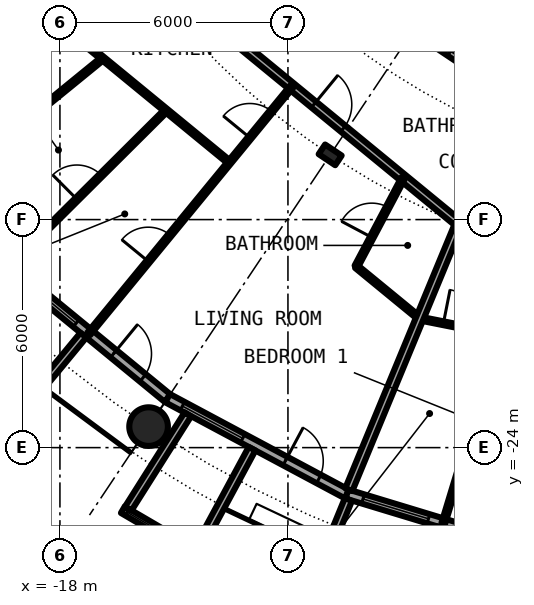
"""IFC4 building model, lengths in metres.
Left out: names, types, materials, properties, quantities, classifications, styles, units other than length and angle.
Written with IfcOpenShell. Run it as: python <this file> out.ifc"""

import sys

from ifc_helpers import new_model, si_unit, direction, frame, frame_2d, origin, origin_2d, place, context, subcontext, project, spatial, rectangle, circle, hollow_circle, i_section, extrude, element, fill, save


model = new_model("IFC4")
c1 = context("Model", 3, precision=1e-05, world=origin(), true_north=direction((0.0, 1.0)))
c2 = subcontext(c1, "Body", "Model", "MODEL_VIEW")
j1 = project(units=[si_unit("LENGTHUNIT", "METRE"), si_unit("PLANEANGLEUNIT", "RADIAN")], contexts=[c1])
p1 = place(None, origin())
s1 = spatial("IfcSite", under=j1, at=p1, CompositionType="ELEMENT")
p2 = place(p1, origin())
s2 = spatial("IfcBuilding", under=s1, at=p2, CompositionType="ELEMENT")
p3 = place(p2, frame((0.0, 0.0, 91.05)))
s3 = spatial("IfcBuildingStorey", under=s2, at=p3, CompositionType="ELEMENT", Elevation=91.05)
p4 = place(p3, frame((-15.667, -23.448, 0.0), z_axis=(0.0, 0.0, 1.0), x_axis=(1.0, 0.0, 0.0)))
e1 = element("IfcColumn", 1, at=p4, inside=s3, PredefinedType="COLUMN", context=c2, shape_type="SweptSolid", body=[
    extrude(hollow_circle(Radius=0.508, WallThickness=0.04, at=origin_2d()), origin(), (0.0, 0.0, 1.0), 3.05),
])
p5 = place(p3, frame((-10.889, -16.297, 0.0), z_axis=(0.0, 0.0, 1.0), x_axis=(-0.55557023302, -0.831469612303, 0.0)))
e2 = element("IfcColumn", 2, at=p5, inside=s3, PredefinedType="COLUMN", context=c2, shape_type="SweptSolid", body=[
    extrude(i_section(OverallWidth=0.306, OverallDepth=0.524, WebThickness=0.021, FlangeThickness=0.04, FilletRadius=0.027, at=origin_2d()), origin(), (0.0, 0.0, 1.0), 3.05),
])
p6 = place(p3, frame((-19.304, -19.304, 0.0), z_axis=(0.0, 0.0, 1.0), x_axis=(0.773019449054, -0.634382322723, 0.0)))
e3 = element("IfcWall", 3, at=p6, inside=s3, PredefinedType="SOLIDWALL", context=c2, shape_type="SweptSolid", body=[
    extrude(rectangle(XDim=5.352, YDim=0.25, at=frame_2d((2.676, 0.0))), origin(), (0.0, 0.0, 1.0), 2.7),
])
p7 = place(p6, frame((0.441, 0.0, 0.3)))
e4 = element("IfcOpeningElement", 4, at=p7, cuts=e3, PredefinedType="OPENING", context=c2, shape_type="SweptSolid", body=[
    extrude(rectangle(XDim=1.8, YDim=2.1, at=frame_2d((0.9, 1.05))), frame((0.0, 0.135, 0.0), z_axis=(0.0, -1.0, 0.0), x_axis=(1.0, 0.0, 0.0)), (0.0, 0.0, 1.0), 0.27),
])
p8 = place(p6, frame((3.51, 0.0, 0.0)))
e5 = element("IfcOpeningElement", 5, at=p8, cuts=e3, PredefinedType="OPENING", context=c2, shape_type="SweptSolid", body=[
    extrude(rectangle(XDim=1.0, YDim=2.2, at=frame_2d((0.5, 1.1))), frame((0.0, 0.135, 0.0), z_axis=(0.0, -1.0, 0.0), x_axis=(1.0, 0.0, 0.0)), (0.0, 0.0, 1.0), 0.27),
])
p9 = place(p3, frame((-17.384, -21.041, -0.03), z_axis=(0.0, 0.0, 1.0), x_axis=(-0.63709551667, -0.770784861449, 0.0)))
e6 = element("IfcWall", 6, at=p9, inside=s3, PredefinedType="SOLIDWALL", context=c2, shape_type="SweptSolid", body=[
    extrude(rectangle(XDim=3.006, YDim=0.2, at=frame_2d((1.503, 0.0))), origin(), (0.0, 0.0, 1.0), 2.73),
])
p10 = place(p3, frame((-15.167, -22.699, 0.0), z_axis=(0.0, 0.0, 1.0), x_axis=(0.881915646801, -0.471407246368, 0.0)))
e7 = element("IfcWall", 7, at=p10, inside=s3, PredefinedType="SOLIDWALL", context=c2, shape_type="SweptSolid", body=[
    extrude(rectangle(XDim=5.352, YDim=0.25, at=frame_2d((2.676, 0.0))), origin(), (0.0, 0.0, 1.0), 2.7),
])
p11 = place(p10, frame((0.441, 0.0, 0.3)))
e8 = element("IfcOpeningElement", 8, at=p11, cuts=e7, PredefinedType="OPENING", context=c2, shape_type="SweptSolid", body=[
    extrude(rectangle(XDim=1.8, YDim=2.1, at=frame_2d((0.9, 1.05))), frame((0.0, 0.135, 0.0), z_axis=(0.0, -1.0, 0.0), x_axis=(1.0, 0.0, 0.0)), (0.0, 0.0, 1.0), 0.27),
])
p12 = place(p10, frame((3.51, 0.0, 0.0)))
e9 = element("IfcOpeningElement", 9, at=p12, cuts=e7, PredefinedType="OPENING", context=c2, shape_type="SweptSolid", body=[
    extrude(rectangle(XDim=1.0, YDim=2.2, at=frame_2d((0.5, 1.1))), frame((0.0, 0.135, 0.0), z_axis=(0.0, -1.0, 0.0), x_axis=(1.0, 0.0, 0.0)), (0.0, 0.0, 1.0), 0.27),
])
p13 = place(p3, frame((-16.344, -25.633, -0.03), z_axis=(0.0, 0.0, 1.0), x_axis=(0.863346521872, -0.504611517081, 0.0)))
e10 = element("IfcWall", 10, at=p13, inside=s3, PredefinedType="SOLIDWALL", context=c2, shape_type="SweptSolid", body=[
    extrude(rectangle(XDim=2.336, YDim=0.2, at=frame_2d((1.168, 0.0))), origin(), (0.0, 0.0, 1.0), 2.73),
])
p14 = place(p13, frame((0.128, 0.0, 0.33)))
e11 = element("IfcOpeningElement", 11, at=p14, cuts=e10, PredefinedType="OPENING", context=c2, shape_type="SweptSolid", body=[
    extrude(circle(Radius=1.04, at=frame_2d((1.04, 1.04))), frame((0.0, 0.11, 0.0), z_axis=(0.0, -1.0, 0.0), x_axis=(1.0, 0.0, 0.0)), (0.0, 0.0, 1.0), 0.22),
])
p15 = place(p3, frame((-14.635, -23.126, -0.03), z_axis=(0.0, 0.0, 1.0), x_axis=(-0.534437802731, -0.845207805816, 0.0)))
e12 = element("IfcWall", 12, at=p15, inside=s3, PredefinedType="SOLIDWALL", context=c2, shape_type="SweptSolid", body=[
    extrude(rectangle(XDim=2.932, YDim=0.2, at=frame_2d((1.466, 0.0))), origin(), (0.0, 0.0, 1.0), 2.73),
])
p16 = place(p3, frame((-12.945, -24.029, -0.03), z_axis=(0.0, 0.0, 1.0), x_axis=(-0.474424310775, -0.88029629861, 0.0)))
e13 = element("IfcWall", 13, at=p16, inside=s3, PredefinedType="SOLIDWALL", context=c2, shape_type="SweptSolid", body=[
    extrude(rectangle(XDim=3.006, YDim=0.2, at=frame_2d((1.503, 0.0))), origin(), (0.0, 0.0, 1.0), 2.73),
])
p17 = place(p3, frame((-10.447, -25.222, 0.0), z_axis=(0.0, 0.0, 1.0), x_axis=(0.956965678721, -0.290201119486, 0.0)))
e14 = element("IfcWall", 14, at=p17, inside=s3, PredefinedType="SOLIDWALL", context=c2, shape_type="SweptSolid", body=[
    extrude(rectangle(XDim=5.351, YDim=0.25, at=frame_2d((2.676, 0.0))), origin(), (0.0, 0.0, 1.0), 2.7),
])
p18 = place(p17, frame((0.441, 0.0, 0.3)))
e15 = element("IfcOpeningElement", 15, at=p18, cuts=e14, PredefinedType="OPENING", context=c2, shape_type="SweptSolid", body=[
    extrude(rectangle(XDim=1.8, YDim=2.1, at=frame_2d((0.9, 1.05))), frame((0.0, 0.135, 0.0), z_axis=(0.0, -1.0, 0.0), x_axis=(1.0, 0.0, 0.0)), (0.0, 0.0, 1.0), 0.27),
])
p19 = place(p17, frame((3.51, 0.0, 0.0)))
e16 = element("IfcOpeningElement", 16, at=p19, cuts=e14, PredefinedType="OPENING", context=c2, shape_type="SweptSolid", body=[
    extrude(rectangle(XDim=1.0, YDim=2.2, at=frame_2d((0.5, 1.1))), frame((0.0, 0.135, 0.0), z_axis=(0.0, -1.0, 0.0), x_axis=(1.0, 0.0, 0.0)), (0.0, 0.0, 1.0), 0.27),
])
p20 = place(p3, frame((-10.409, -25.364, -0.03), z_axis=(0.0, 0.0, 1.0), x_axis=(-0.379509886562, -0.925187681501, 0.0)))
e17 = element("IfcWall", 17, at=p20, inside=s3, PredefinedType="SOLIDWALL", context=c2, shape_type="SweptSolid", body=[
    extrude(rectangle(XDim=2.883, YDim=0.2, at=frame_2d((1.441, 0.0))), origin(), (0.0, 0.0, 1.0), 2.73),
])
p21 = place(p3, frame((-8.009, -26.092, -0.03), z_axis=(0.0, 0.0, 1.0), x_axis=(-0.293406695073, -0.955987715029, 0.0)))
e18 = element("IfcWall", 18, at=p21, inside=s3, PredefinedType="SOLIDWALL", context=c2, shape_type="SweptSolid", body=[
    extrude(rectangle(XDim=3.006, YDim=0.2, at=frame_2d((1.503, 0.0))), origin(), (0.0, 0.0, 1.0), 2.73),
])
p22 = place(p3, frame((-8.536, -20.603, 0.0), z_axis=(0.0, 0.0, 1.0), x_axis=(0.980795826794, -0.195037294239, 0.0)))
e19 = element("IfcWall", 19, at=p22, inside=s3, PredefinedType="PARTITIONING", context=c2, shape_type="SweptSolid", body=[
    extrude(rectangle(XDim=4.352, YDim=0.1, at=frame_2d((2.176, 0.0))), origin(), (0.0, 0.0, 1.0), 2.7),
])
p23 = place(p22, frame((0.639, 0.0, 0.0)))
e20 = element("IfcOpeningElement", 20, at=p23, cuts=e19, PredefinedType="OPENING", context=c2, shape_type="SweptSolid", body=[
    extrude(rectangle(XDim=0.9, YDim=2.3, at=frame_2d((0.45, 1.15))), frame((0.0, 0.06, 0.0), z_axis=(0.0, -1.0, 0.0), x_axis=(1.0, 0.0, 0.0)), (0.0, 0.0, 1.0), 0.12),
])
p24 = place(p3, frame((-18.542, -12.389, 0.0), z_axis=(0.0, 0.0, 1.0), x_axis=(0.77296666644, -0.634446634929, 0.0)))
e21 = element("IfcWall", 21, at=p24, inside=s3, PredefinedType="PARTITIONING", context=c2, shape_type="SweptSolid", body=[
    extrude(rectangle(XDim=6.474, YDim=0.1, at=frame_2d((3.237, 0.0))), origin(), (0.0, 0.0, 1.0), 2.7),
])
p25 = place(p3, frame((-10.202, -19.234, 0.0), z_axis=(0.0, 0.0, 1.0), x_axis=(0.772948171844, -0.634469166818, 0.0)))
e22 = element("IfcWall", 22, at=p25, inside=s3, PredefinedType="PARTITIONING", context=c2, shape_type="SweptSolid", body=[
    extrude(rectangle(XDim=2.158, YDim=0.1, at=frame_2d((1.079, 0.0))), origin(), (0.0, 0.0, 1.0), 2.7),
])
p26 = place(p3, frame((-16.173, -10.991, 0.0), z_axis=(0.0, 0.0, 1.0), x_axis=(0.773013989296, -0.634388975591, 0.0)))
e23 = element("IfcWall", 23, at=p26, inside=s3, PredefinedType="PARTITIONING", context=c2, shape_type="SweptSolid", body=[
    extrude(rectangle(XDim=11.219, YDim=0.2, at=frame_2d((5.609, 0.0))), origin(), (0.0, 0.0, 1.0), 2.38),
])
p27 = place(p26, frame((6.278, 0.0, 0.0)))
e24 = element("IfcOpeningElement", 24, at=p27, cuts=e23, PredefinedType="OPENING", context=c2, shape_type="SweptSolid", body=[
    extrude(rectangle(XDim=1.0, YDim=2.3, at=frame_2d((0.5, 1.15))), frame((0.0, 0.11, 0.0), z_axis=(0.0, -1.0, 0.0), x_axis=(1.0, 0.0, 0.0)), (0.0, 0.0, 1.0), 0.22),
])
p28 = place(p3, frame((-12.706, -10.291, 0.0), z_axis=(0.0, 0.0, 1.0), x_axis=(0.831588572532, -0.555392155178, 0.0)))
e25 = element("IfcWall", 25, at=p28, inside=s3, PredefinedType="PARTITIONING", context=c2, shape_type="SweptSolid", body=[
    extrude(rectangle(XDim=11.314, YDim=0.2, at=frame_2d((5.657, 0.0))), origin(), (0.0, 0.0, 1.0), 2.7),
])
p29 = place(p28, frame((5.966, 0.0, 0.0)))
e26 = element("IfcOpeningElement", 26, at=p29, cuts=e25, PredefinedType="OPENING", context=c2, shape_type="SweptSolid", body=[
    extrude(rectangle(XDim=1.0, YDim=2.3, at=frame_2d((0.5, 1.15))), frame((0.0, 0.11, 0.0), z_axis=(0.0, -1.0, 0.0), x_axis=(1.0, 0.0, 0.0)), (0.0, 0.0, 1.0), 0.22),
])
p30 = place(p3, frame((-22.595, -15.097, 0.0), z_axis=(0.0, 0.0, 1.0), x_axis=(0.831505405283, 0.555516661303, 0.0)))
e27 = element("IfcWall", 27, at=p30, inside=s3, PredefinedType="PARTITIONING", context=c2, shape_type="SweptSolid", body=[
    extrude(rectangle(XDim=7.312, YDim=0.2, at=frame_2d((3.656, 0.0))), origin(), (0.0, 0.0, 1.0), 2.7),
])
p31 = place(p3, frame((-21.061, -17.173, 0.0), z_axis=(0.0, 0.0, 1.0), x_axis=(0.774926754572, 0.632051046236, 0.0)))
e28 = element("IfcWall", 28, at=p31, inside=s3, PredefinedType="PARTITIONING", context=c2, shape_type="SweptSolid", body=[
    extrude(rectangle(XDim=5.403, YDim=0.1, at=frame_2d((2.702, 0.0))), origin(), (0.0, 0.0, 1.0), 2.7),
])
p32 = place(p31, frame((2.252, 0.0, 0.0)))
e29 = element("IfcOpeningElement", 29, at=p32, cuts=e28, PredefinedType="OPENING", context=c2, shape_type="SweptSolid", body=[
    extrude(rectangle(XDim=0.9, YDim=2.3, at=frame_2d((0.45, 1.15))), frame((0.0, 0.06, 0.0), z_axis=(0.0, -1.0, 0.0), x_axis=(1.0, 0.0, 0.0)), (0.0, 0.0, 1.0), 0.12),
])
p33 = place(p3, frame((-19.265, -19.166, 0.0), z_axis=(0.0, 0.0, 1.0), x_axis=(0.708831450128, 0.705377895393, 0.0)))
e30 = element("IfcWall", 30, at=p33, inside=s3, PredefinedType="PARTITIONING", context=c2, shape_type="SweptSolid", body=[
    extrude(rectangle(XDim=5.726, YDim=0.1, at=frame_2d((2.863, 0.0))), origin(), (0.0, 0.0, 1.0), 2.7),
])
p34 = place(p33, frame((2.413, 0.0, 0.0)))
e31 = element("IfcOpeningElement", 31, at=p34, cuts=e30, PredefinedType="OPENING", context=c2, shape_type="SweptSolid", body=[
    extrude(rectangle(XDim=0.9, YDim=2.3, at=frame_2d((0.45, 1.15))), frame((0.0, 0.06, 0.0), z_axis=(0.0, -1.0, 0.0), x_axis=(1.0, 0.0, 0.0)), (0.0, 0.0, 1.0), 0.12),
])
p35 = place(p3, frame((-17.241, -21.006, 0.0), z_axis=(0.0, 0.0, 1.0), x_axis=(0.634522338131, 0.772904523478, 0.0)))
e32 = element("IfcWall", 32, at=p35, inside=s3, PredefinedType="PARTITIONING", context=c2, shape_type="SweptSolid", body=[
    extrude(rectangle(XDim=8.419, YDim=0.1, at=frame_2d((4.209, 0.0))), origin(), (0.0, 0.0, 1.0), 2.7),
])
p36 = place(p35, frame((6.677, 0.0, 0.0)))
e33 = element("IfcOpeningElement", 33, at=p36, cuts=e32, PredefinedType="OPENING", context=c2, shape_type="SweptSolid", body=[
    extrude(rectangle(XDim=0.9, YDim=2.3, at=frame_2d((0.45, 1.15))), frame((0.0, 0.06, 0.0), z_axis=(0.0, -1.0, 0.0), x_axis=(1.0, 0.0, 0.0)), (0.0, 0.0, 1.0), 0.12),
])
p37 = place(p35, frame((2.466, 0.0, 0.0)))
e34 = element("IfcOpeningElement", 34, at=p37, cuts=e32, PredefinedType="OPENING", context=c2, shape_type="SweptSolid", body=[
    extrude(rectangle(XDim=0.9, YDim=2.3, at=frame_2d((0.45, 1.15))), frame((0.0, 0.06, 0.0), z_axis=(0.0, -1.0, 0.0), x_axis=(1.0, 0.0, 0.0)), (0.0, 0.0, 1.0), 0.12),
])
p38 = place(p3, frame((-10.399, -25.106, 0.0), z_axis=(0.0, 0.0, 1.0), x_axis=(0.382600411313, 0.923913916587, 0.0)))
e35 = element("IfcWall", 35, at=p38, inside=s3, PredefinedType="PARTITIONING", context=c2, shape_type="SweptSolid", body=[
    extrude(rectangle(XDim=7.574, YDim=0.2, at=frame_2d((3.787, 0.0))), origin(), (0.0, 0.0, 1.0), 2.7),
])
p39 = place(p3, frame((-10.202, -19.234, 0.0), z_axis=(0.0, 0.0, 1.0), x_axis=(0.468462103808, 0.883483591979, 0.0)))
e36 = element("IfcWall", 36, at=p39, inside=s3, PredefinedType="PARTITIONING", context=c2, shape_type="SweptSolid", body=[
    extrude(rectangle(XDim=2.636, YDim=0.1, at=frame_2d((1.318, 0.0))), origin(), (0.0, 0.0, 1.0), 2.7),
])
p40 = place(p39, frame((0.868, 0.0, 0.0)))
e37 = element("IfcOpeningElement", 37, at=p40, cuts=e36, PredefinedType="OPENING", context=c2, shape_type="SweptSolid", body=[
    extrude(rectangle(XDim=0.9, YDim=2.3, at=frame_2d((0.45, 1.15))), frame((0.0, 0.06, 0.0), z_axis=(0.0, -1.0, 0.0), x_axis=(1.0, 0.0, 0.0)), (0.0, 0.0, 1.0), 0.12),
])
p41 = place(p3, frame((-7.913, -25.997, 0.0), z_axis=(0.0, 0.0, 1.0), x_axis=(0.291264462755, 0.956642573136, 0.0)))
e38 = element("IfcWall", 38, at=p41, inside=s3, PredefinedType="PARTITIONING", context=c2, shape_type="SweptSolid", body=[
    extrude(rectangle(XDim=5.195, YDim=0.1, at=frame_2d((2.598, 0.0))), origin(), (0.0, 0.0, 1.0), 2.7),
])
p42 = place(p7, origin())
e39 = element("IfcWindow", 39, at=p42, inside=s3, PartitioningType="SINGLE_PANEL", PredefinedType="WINDOW", context=c2, shape_type="SweptSolid", body=[
    extrude(rectangle(XDim=1.8, YDim=2.1, at=frame_2d((0.9, 1.05))), frame((0.0, 0.03, 0.0), z_axis=(0.0, -1.0, 0.0), x_axis=(1.0, 0.0, 0.0)), (0.0, 0.0, 1.0), 0.06),
])
fill(e4, e39)
p43 = place(p8, origin())
e40 = element("IfcDoor", 40, at=p43, inside=s3, OperationType="SINGLE_SWING_LEFT", PredefinedType="DOOR", context=c2, shape_type="SweptSolid", body=[
    extrude(rectangle(XDim=1.0, YDim=2.2, at=frame_2d((0.5, 1.1))), frame((0.0, 0.025, 0.0), z_axis=(0.0, -1.0, 0.0), x_axis=(1.0, 0.0, 0.0)), (0.0, 0.0, 1.0), 0.05),
])
fill(e5, e40)
p44 = place(p11, origin())
e41 = element("IfcWindow", 41, at=p44, inside=s3, PartitioningType="SINGLE_PANEL", PredefinedType="WINDOW", context=c2, shape_type="SweptSolid", body=[
    extrude(rectangle(XDim=1.8, YDim=2.1, at=frame_2d((0.9, 1.05))), frame((0.0, 0.03, 0.0), z_axis=(0.0, -1.0, 0.0), x_axis=(1.0, 0.0, 0.0)), (0.0, 0.0, 1.0), 0.06),
])
fill(e8, e41)
p45 = place(p14, origin())
e42 = element("IfcWindow", 42, at=p45, inside=s3, PartitioningType="SINGLE_PANEL", PredefinedType="WINDOW", context=c2, shape_type="SweptSolid", body=[
    extrude(circle(Radius=1.04, at=frame_2d((1.04, 1.04))), frame((0.0, 0.03, 0.0), z_axis=(0.0, -1.0, 0.0), x_axis=(1.0, 0.0, 0.0)), (0.0, 0.0, 1.0), 0.06),
])
fill(e11, e42)
p46 = place(p12, origin())
e43 = element("IfcDoor", 43, at=p46, inside=s3, OperationType="SINGLE_SWING_LEFT", PredefinedType="DOOR", context=c2, shape_type="SweptSolid", body=[
    extrude(rectangle(XDim=1.0, YDim=2.2, at=frame_2d((0.5, 1.1))), frame((0.0, 0.025, 0.0), z_axis=(0.0, -1.0, 0.0), x_axis=(1.0, 0.0, 0.0)), (0.0, 0.0, 1.0), 0.05),
])
fill(e9, e43)
p47 = place(p18, origin())
e44 = element("IfcWindow", 44, at=p47, inside=s3, PartitioningType="SINGLE_PANEL", PredefinedType="WINDOW", context=c2, shape_type="SweptSolid", body=[
    extrude(rectangle(XDim=1.8, YDim=2.1, at=frame_2d((0.9, 1.05))), frame((0.0, 0.03, 0.0), z_axis=(0.0, -1.0, 0.0), x_axis=(1.0, 0.0, 0.0)), (0.0, 0.0, 1.0), 0.06),
])
fill(e15, e44)
p48 = place(p27, origin())
e45 = element("IfcDoor", 45, at=p48, inside=s3, OperationType="SINGLE_SWING_RIGHT", PredefinedType="DOOR", context=c2, shape_type="SweptSolid", body=[
    extrude(rectangle(XDim=1.0, YDim=2.3, at=frame_2d((0.5, 1.15))), frame((0.0, 0.025, 0.0), z_axis=(0.0, -1.0, 0.0), x_axis=(1.0, 0.0, 0.0)), (0.0, 0.0, 1.0), 0.05),
])
fill(e24, e45)
p49 = place(p40, origin())
e46 = element("IfcDoor", 46, at=p49, inside=s3, OperationType="SINGLE_SWING_RIGHT", PredefinedType="DOOR", context=c2, shape_type="SweptSolid", body=[
    extrude(rectangle(XDim=0.9, YDim=2.3, at=frame_2d((0.45, 1.15))), frame((0.0, 0.025, 0.0), z_axis=(0.0, -1.0, 0.0), x_axis=(1.0, 0.0, 0.0)), (0.0, 0.0, 1.0), 0.05),
])
fill(e37, e46)
p50 = place(p36, origin())
e47 = element("IfcDoor", 47, at=p50, inside=s3, OperationType="SINGLE_SWING_RIGHT", PredefinedType="DOOR", context=c2, shape_type="SweptSolid", body=[
    extrude(rectangle(XDim=0.9, YDim=2.3, at=frame_2d((0.45, 1.15))), frame((0.0, 0.025, 0.0), z_axis=(0.0, -1.0, 0.0), x_axis=(1.0, 0.0, 0.0)), (0.0, 0.0, 1.0), 0.05),
])
fill(e33, e47)
p51 = place(p37, origin())
e48 = element("IfcDoor", 48, at=p51, inside=s3, OperationType="SINGLE_SWING_LEFT", PredefinedType="DOOR", context=c2, shape_type="SweptSolid", body=[
    extrude(rectangle(XDim=0.9, YDim=2.3, at=frame_2d((0.45, 1.15))), frame((0.0, 0.025, 0.0), z_axis=(0.0, -1.0, 0.0), x_axis=(1.0, 0.0, 0.0)), (0.0, 0.0, 1.0), 0.05),
])
fill(e34, e48)
p52 = place(p34, origin())
e49 = element("IfcDoor", 49, at=p52, inside=s3, OperationType="SINGLE_SWING_LEFT", PredefinedType="DOOR", context=c2, shape_type="SweptSolid", body=[
    extrude(rectangle(XDim=0.9, YDim=2.3, at=frame_2d((0.45, 1.15))), frame((0.0, 0.025, 0.0), z_axis=(0.0, -1.0, 0.0), x_axis=(1.0, 0.0, 0.0)), (0.0, 0.0, 1.0), 0.05),
])
fill(e31, e49)
p53 = place(p23, origin())
e50 = element("IfcDoor", 50, at=p53, inside=s3, OperationType="SINGLE_SWING_LEFT", PredefinedType="DOOR", context=c2, shape_type="SweptSolid", body=[
    extrude(rectangle(XDim=0.9, YDim=2.3, at=frame_2d((0.45, 1.15))), frame((0.0, 0.025, 0.0), z_axis=(0.0, -1.0, 0.0), x_axis=(1.0, 0.0, 0.0)), (0.0, 0.0, 1.0), 0.05),
])
fill(e20, e50)
p54 = place(p29, origin())
e51 = element("IfcDoor", 51, at=p54, inside=s3, OperationType="SINGLE_SWING_RIGHT", PredefinedType="DOOR", context=c2, shape_type="SweptSolid", body=[
    extrude(rectangle(XDim=1.0, YDim=2.3, at=frame_2d((0.5, 1.15))), frame((0.0, 0.025, 0.0), z_axis=(0.0, -1.0, 0.0), x_axis=(1.0, 0.0, 0.0)), (0.0, 0.0, 1.0), 0.05),
])
fill(e26, e51)
save(model, sys.argv[1])
